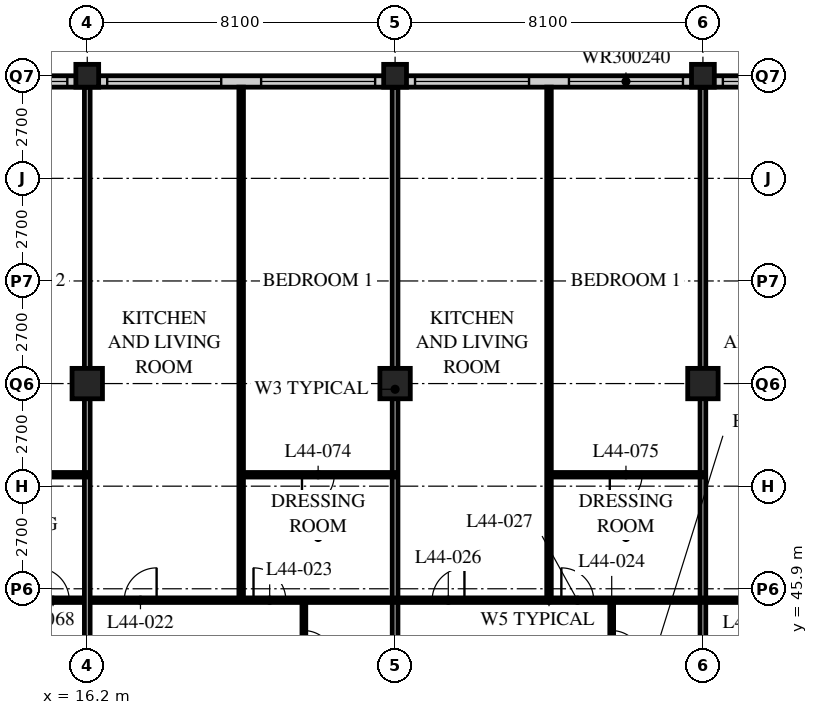
"""IFC4 building model, lengths in metres.
Left out: names, types, materials, properties, quantities, classifications, styles, units other than length and angle.
Written with IfcOpenShell. Run it as: python <this file> out.ifc"""

import sys

from ifc_helpers import new_model, si_unit, direction, frame, frame_2d, origin, origin_2d, place, context, subcontext, project, spatial, rectangle, hollow_rectangle, extrude, element, fill, save


model = new_model("IFC4")
c1 = context("Model", 3, precision=1e-05, world=origin(), true_north=direction((0.0, 1.0)))
c2 = subcontext(c1, "Body", "Model", "MODEL_VIEW")
j1 = project(units=[si_unit("LENGTHUNIT", "METRE"), si_unit("PLANEANGLEUNIT", "RADIAN")], contexts=[c1])
p1 = place(None, origin())
s1 = spatial("IfcSite", under=j1, at=p1, CompositionType="ELEMENT")
p2 = place(p1, origin())
s2 = spatial("IfcBuilding", under=s1, at=p2, CompositionType="ELEMENT")
p3 = place(p2, frame((0.0, 0.0, 174.0)))
s3 = spatial("IfcBuildingStorey", under=s2, at=p3, CompositionType="ELEMENT", Elevation=174.0)
p4 = place(p3, frame((16.2, 51.3, 0.0), z_axis=(0.0, 0.0, 1.0), x_axis=(1.0, 0.0, 0.0)))
e1 = element("IfcColumn", 1, at=p4, inside=s3, PredefinedType="COLUMN", context=c2, shape_type="SweptSolid", body=[
    extrude(hollow_rectangle(XDim=0.8, YDim=0.8, WallThickness=0.08, at=origin_2d()), origin(), (0.0, 0.0, 1.0), 3.6),
])
p5 = place(p3, frame((16.2, 59.4, 0.0), z_axis=(0.0, 0.0, 1.0), x_axis=(1.0, 0.0, 0.0)))
e2 = element("IfcColumn", 2, at=p5, inside=s3, PredefinedType="COLUMN", context=c2, shape_type="SweptSolid", body=[
    extrude(hollow_rectangle(XDim=0.6, YDim=0.6, WallThickness=0.05, at=origin_2d()), origin(), (0.0, 0.0, 1.0), 3.6),
])
p6 = place(p3, frame((24.3, 51.3, 0.0), z_axis=(0.0, 0.0, 1.0), x_axis=(1.0, 0.0, 0.0)))
e3 = element("IfcColumn", 3, at=p6, inside=s3, PredefinedType="COLUMN", context=c2, shape_type="SweptSolid", body=[
    extrude(hollow_rectangle(XDim=0.8, YDim=0.8, WallThickness=0.08, at=origin_2d()), origin(), (0.0, 0.0, 1.0), 3.6),
])
p7 = place(p3, frame((24.3, 59.4, 0.0), z_axis=(0.0, 0.0, 1.0), x_axis=(1.0, 0.0, 0.0)))
e4 = element("IfcColumn", 4, at=p7, inside=s3, PredefinedType="COLUMN", context=c2, shape_type="SweptSolid", body=[
    extrude(hollow_rectangle(XDim=0.6, YDim=0.6, WallThickness=0.05, at=origin_2d()), origin(), (0.0, 0.0, 1.0), 3.6),
])
p8 = place(p3, frame((32.4, 51.3, 0.0), z_axis=(0.0, 0.0, 1.0), x_axis=(1.0, 0.0, 0.0)))
e5 = element("IfcColumn", 5, at=p8, inside=s3, PredefinedType="COLUMN", context=c2, shape_type="SweptSolid", body=[
    extrude(hollow_rectangle(XDim=0.8, YDim=0.8, WallThickness=0.08, at=origin_2d()), origin(), (0.0, 0.0, 1.0), 3.6),
])
p9 = place(p3, frame((32.4, 59.4, 0.0), z_axis=(0.0, 0.0, 1.0), x_axis=(1.0, 0.0, 0.0)))
e6 = element("IfcColumn", 6, at=p9, inside=s3, PredefinedType="COLUMN", context=c2, shape_type="SweptSolid", body=[
    extrude(hollow_rectangle(XDim=0.6, YDim=0.6, WallThickness=0.05, at=origin_2d()), origin(), (0.0, 0.0, 1.0), 3.6),
])
p10 = place(p3, frame((48.3, 59.25, 0.0), z_axis=(0.0, 0.0, 1.0), x_axis=(-1.0, 0.0, 0.0)))
e7 = element("IfcWall", 7, at=p10, inside=s3, PredefinedType="SOLIDWALL", context=c2, shape_type="SweptSolid", body=[
    extrude(rectangle(XDim=40.2, YDim=0.3, at=frame_2d((20.1, 0.0))), origin(), (0.0, 0.0, 1.0), 3.39),
])
p11 = place(p10, frame((0.225, 0.0, 0.6)))
e8 = element("IfcOpeningElement", 8, at=p11, cuts=e7, PredefinedType="OPENING", context=c2, shape_type="SweptSolid", body=[
    extrude(rectangle(XDim=3.0, YDim=2.4, at=frame_2d((1.5, 1.2))), frame((0.0, 0.16, 0.0), z_axis=(0.0, -1.0, 0.0), x_axis=(1.0, 0.0, 0.0)), (0.0, 0.0, 1.0), 0.32),
])
p12 = place(p10, frame((4.275, 0.0, 0.6)))
e9 = element("IfcOpeningElement", 9, at=p12, cuts=e7, PredefinedType="OPENING", context=c2, shape_type="SweptSolid", body=[
    extrude(rectangle(XDim=3.0, YDim=2.4, at=frame_2d((1.5, 1.2))), frame((0.0, 0.16, 0.0), z_axis=(0.0, -1.0, 0.0), x_axis=(1.0, 0.0, 0.0)), (0.0, 0.0, 1.0), 0.32),
])
p13 = place(p10, frame((8.325, 0.0, 0.6)))
e10 = element("IfcOpeningElement", 10, at=p13, cuts=e7, PredefinedType="OPENING", context=c2, shape_type="SweptSolid", body=[
    extrude(rectangle(XDim=3.0, YDim=2.4, at=frame_2d((1.5, 1.2))), frame((0.0, 0.16, 0.0), z_axis=(0.0, -1.0, 0.0), x_axis=(1.0, 0.0, 0.0)), (0.0, 0.0, 1.0), 0.32),
])
p14 = place(p10, frame((12.375, 0.0, 0.6)))
e11 = element("IfcOpeningElement", 11, at=p14, cuts=e7, PredefinedType="OPENING", context=c2, shape_type="SweptSolid", body=[
    extrude(rectangle(XDim=3.0, YDim=2.4, at=frame_2d((1.5, 1.2))), frame((0.0, 0.16, 0.0), z_axis=(0.0, -1.0, 0.0), x_axis=(1.0, 0.0, 0.0)), (0.0, 0.0, 1.0), 0.32),
])
p15 = place(p10, frame((16.425, 0.0, 0.6)))
e12 = element("IfcOpeningElement", 12, at=p15, cuts=e7, PredefinedType="OPENING", context=c2, shape_type="SweptSolid", body=[
    extrude(rectangle(XDim=3.0, YDim=2.4, at=frame_2d((1.5, 1.2))), frame((0.0, 0.16, 0.0), z_axis=(0.0, -1.0, 0.0), x_axis=(1.0, 0.0, 0.0)), (0.0, 0.0, 1.0), 0.32),
])
p16 = place(p10, frame((20.475, 0.0, 0.6)))
e13 = element("IfcOpeningElement", 13, at=p16, cuts=e7, PredefinedType="OPENING", context=c2, shape_type="SweptSolid", body=[
    extrude(rectangle(XDim=3.0, YDim=2.4, at=frame_2d((1.5, 1.2))), frame((0.0, 0.16, 0.0), z_axis=(0.0, -1.0, 0.0), x_axis=(1.0, 0.0, 0.0)), (0.0, 0.0, 1.0), 0.32),
])
p17 = place(p10, frame((24.525, 0.0, 0.6)))
e14 = element("IfcOpeningElement", 14, at=p17, cuts=e7, PredefinedType="OPENING", context=c2, shape_type="SweptSolid", body=[
    extrude(rectangle(XDim=3.0, YDim=2.4, at=frame_2d((1.5, 1.2))), frame((0.0, 0.16, 0.0), z_axis=(0.0, -1.0, 0.0), x_axis=(1.0, 0.0, 0.0)), (0.0, 0.0, 1.0), 0.32),
])
p18 = place(p10, frame((28.575, 0.0, 0.6)))
e15 = element("IfcOpeningElement", 15, at=p18, cuts=e7, PredefinedType="OPENING", context=c2, shape_type="SweptSolid", body=[
    extrude(rectangle(XDim=3.0, YDim=2.4, at=frame_2d((1.5, 1.2))), frame((0.0, 0.16, 0.0), z_axis=(0.0, -1.0, 0.0), x_axis=(1.0, 0.0, 0.0)), (0.0, 0.0, 1.0), 0.32),
])
p19 = place(p10, frame((32.625, 0.0, 0.6)))
e16 = element("IfcOpeningElement", 16, at=p19, cuts=e7, PredefinedType="OPENING", context=c2, shape_type="SweptSolid", body=[
    extrude(rectangle(XDim=3.0, YDim=2.4, at=frame_2d((1.5, 1.2))), frame((0.0, 0.16, 0.0), z_axis=(0.0, -1.0, 0.0), x_axis=(1.0, 0.0, 0.0)), (0.0, 0.0, 1.0), 0.32),
])
p20 = place(p10, frame((36.675, 0.0, 0.6)))
e17 = element("IfcOpeningElement", 17, at=p20, cuts=e7, PredefinedType="OPENING", context=c2, shape_type="SweptSolid", body=[
    extrude(rectangle(XDim=3.0, YDim=2.4, at=frame_2d((1.5, 1.2))), frame((0.0, 0.16, 0.0), z_axis=(0.0, -1.0, 0.0), x_axis=(1.0, 0.0, 0.0)), (0.0, 0.0, 1.0), 0.32),
])
p21 = place(p3, frame((21.9, 43.2, 0.0), z_axis=(0.0, 0.0, 1.0), x_axis=(0.0, 1.0, 0.0)))
e18 = element("IfcWall", 18, at=p21, inside=s3, PredefinedType="PARTITIONING", context=c2, shape_type="SweptSolid", body=[
    extrude(rectangle(XDim=2.4, YDim=0.1, at=frame_2d((1.2, 0.0))), origin(), (0.0, 0.0, 1.0), 3.39),
])
p22 = place(p21, frame((0.8, 0.0, 0.0)))
e19 = element("IfcOpeningElement", 19, at=p22, cuts=e18, PredefinedType="OPENING", context=c2, shape_type="SweptSolid", body=[
    extrude(rectangle(XDim=0.8, YDim=2.1, at=frame_2d((0.4, 1.05))), frame((0.0, 0.06, 0.0), z_axis=(0.0, -1.0, 0.0), x_axis=(1.0, 0.0, 0.0)), (0.0, 0.0, 1.0), 0.12),
])
p23 = place(p3, frame((20.25, 45.6, 0.0), z_axis=(0.0, 0.0, 1.0), x_axis=(0.0, 1.0, 0.0)))
e20 = element("IfcWall", 20, at=p23, inside=s3, PredefinedType="PARTITIONING", context=c2, shape_type="SweptSolid", body=[
    extrude(rectangle(XDim=13.5, YDim=0.12, at=frame_2d((6.75, 0.0))), origin(), (0.0, 0.0, 1.0), 3.39),
])
p24 = place(p3, frame((24.3, 43.2, 0.0), z_axis=(0.0, 0.0, 1.0), x_axis=(0.0, 1.0, 0.0)))
e21 = element("IfcWall", 21, at=p24, inside=s3, PredefinedType="PARTITIONING", context=c2, shape_type="SweptSolid", body=[
    extrude(rectangle(XDim=15.9, YDim=0.15, at=frame_2d((7.95, 0.0))), origin(), (0.0, 0.0, 1.0), 2.778),
])
p25 = place(p3, frame((30.0, 43.2, 0.0), z_axis=(0.0, 0.0, 1.0), x_axis=(0.0, 1.0, 0.0)))
e22 = element("IfcWall", 22, at=p25, inside=s3, PredefinedType="PARTITIONING", context=c2, shape_type="SweptSolid", body=[
    extrude(rectangle(XDim=2.4, YDim=0.1, at=frame_2d((1.2, 0.0))), origin(), (0.0, 0.0, 1.0), 3.39),
])
p26 = place(p25, frame((0.8, 0.0, 0.0)))
e23 = element("IfcOpeningElement", 23, at=p26, cuts=e22, PredefinedType="OPENING", context=c2, shape_type="SweptSolid", body=[
    extrude(rectangle(XDim=0.8, YDim=2.1, at=frame_2d((0.4, 1.05))), frame((0.0, 0.06, 0.0), z_axis=(0.0, -1.0, 0.0), x_axis=(1.0, 0.0, 0.0)), (0.0, 0.0, 1.0), 0.12),
])
p27 = place(p3, frame((28.35, 45.6, 0.0), z_axis=(0.0, 0.0, 1.0), x_axis=(0.0, 1.0, 0.0)))
e24 = element("IfcWall", 24, at=p27, inside=s3, PredefinedType="PARTITIONING", context=c2, shape_type="SweptSolid", body=[
    extrude(rectangle(XDim=13.5, YDim=0.12, at=frame_2d((6.75, 0.0))), origin(), (0.0, 0.0, 1.0), 3.39),
])
p28 = place(p3, frame((32.4, 43.2, 0.0), z_axis=(0.0, 0.0, 1.0), x_axis=(0.0, 1.0, 0.0)))
e25 = element("IfcWall", 25, at=p28, inside=s3, PredefinedType="PARTITIONING", context=c2, shape_type="SweptSolid", body=[
    extrude(rectangle(XDim=15.9, YDim=0.15, at=frame_2d((7.95, 0.0))), origin(), (0.0, 0.0, 1.0), 2.778),
])
p29 = place(p3, frame((8.15, 45.6, 0.0), z_axis=(0.0, 0.0, 1.0), x_axis=(1.0, 0.0, 0.0)))
e26 = element("IfcWall", 26, at=p29, inside=s3, PredefinedType="PARTITIONING", context=c2, shape_type="SweptSolid", body=[
    extrude(rectangle(XDim=40.4, YDim=0.12, at=frame_2d((20.2, 0.0))), origin(), (0.0, 0.0, 1.0), 3.39),
])
p30 = place(p29, frame((9.025, 0.0, 0.0)))
e27 = element("IfcOpeningElement", 27, at=p30, cuts=e26, PredefinedType="OPENING", context=c2, shape_type="SweptSolid", body=[
    extrude(rectangle(XDim=0.85, YDim=2.1, at=frame_2d((0.425, 1.05))), frame((0.0, 0.07, 0.0), z_axis=(0.0, -1.0, 0.0), x_axis=(1.0, 0.0, 0.0)), (0.0, 0.0, 1.0), 0.14),
])
p31 = place(p29, frame((12.425, 0.0, 0.0)))
e28 = element("IfcOpeningElement", 28, at=p31, cuts=e26, PredefinedType="OPENING", context=c2, shape_type="SweptSolid", body=[
    extrude(rectangle(XDim=0.85, YDim=2.1, at=frame_2d((0.425, 1.05))), frame((0.0, 0.07, 0.0), z_axis=(0.0, -1.0, 0.0), x_axis=(1.0, 0.0, 0.0)), (0.0, 0.0, 1.0), 0.14),
])
p32 = place(p29, frame((17.125, 0.0, 0.0)))
e29 = element("IfcOpeningElement", 29, at=p32, cuts=e26, PredefinedType="OPENING", context=c2, shape_type="SweptSolid", body=[
    extrude(rectangle(XDim=0.85, YDim=2.1, at=frame_2d((0.425, 1.05))), frame((0.0, 0.07, 0.0), z_axis=(0.0, -1.0, 0.0), x_axis=(1.0, 0.0, 0.0)), (0.0, 0.0, 1.0), 0.14),
])
p33 = place(p29, frame((20.525, 0.0, 0.0)))
e30 = element("IfcOpeningElement", 30, at=p33, cuts=e26, PredefinedType="OPENING", context=c2, shape_type="SweptSolid", body=[
    extrude(rectangle(XDim=0.85, YDim=2.1, at=frame_2d((0.425, 1.05))), frame((0.0, 0.07, 0.0), z_axis=(0.0, -1.0, 0.0), x_axis=(1.0, 0.0, 0.0)), (0.0, 0.0, 1.0), 0.14),
])
p34 = place(p29, frame((25.225, 0.0, 0.0)))
e31 = element("IfcOpeningElement", 31, at=p34, cuts=e26, PredefinedType="OPENING", context=c2, shape_type="SweptSolid", body=[
    extrude(rectangle(XDim=0.85, YDim=2.1, at=frame_2d((0.425, 1.05))), frame((0.0, 0.07, 0.0), z_axis=(0.0, -1.0, 0.0), x_axis=(1.0, 0.0, 0.0)), (0.0, 0.0, 1.0), 0.14),
])
p35 = place(p29, frame((28.625, 0.0, 0.0)))
e32 = element("IfcOpeningElement", 32, at=p35, cuts=e26, PredefinedType="OPENING", context=c2, shape_type="SweptSolid", body=[
    extrude(rectangle(XDim=0.85, YDim=2.1, at=frame_2d((0.425, 1.05))), frame((0.0, 0.07, 0.0), z_axis=(0.0, -1.0, 0.0), x_axis=(1.0, 0.0, 0.0)), (0.0, 0.0, 1.0), 0.14),
])
p36 = place(p29, frame((32.825, 0.0, 0.0)))
e33 = element("IfcOpeningElement", 33, at=p36, cuts=e26, PredefinedType="OPENING", context=c2, shape_type="SweptSolid", body=[
    extrude(rectangle(XDim=0.85, YDim=2.1, at=frame_2d((0.425, 1.05))), frame((0.0, 0.07, 0.0), z_axis=(0.0, -1.0, 0.0), x_axis=(1.0, 0.0, 0.0)), (0.0, 0.0, 1.0), 0.14),
])
p37 = place(p29, frame((36.675, 0.0, 0.0)))
e34 = element("IfcOpeningElement", 34, at=p37, cuts=e26, PredefinedType="OPENING", context=c2, shape_type="SweptSolid", body=[
    extrude(rectangle(XDim=0.85, YDim=2.1, at=frame_2d((0.425, 1.05))), frame((0.0, 0.07, 0.0), z_axis=(0.0, -1.0, 0.0), x_axis=(1.0, 0.0, 0.0)), (0.0, 0.0, 1.0), 0.14),
])
p38 = place(p29, frame((6.725, 0.0, 0.0)))
e35 = element("IfcOpeningElement", 35, at=p38, cuts=e26, PredefinedType="OPENING", context=c2, shape_type="SweptSolid", body=[
    extrude(rectangle(XDim=0.85, YDim=2.1, at=frame_2d((0.425, 1.05))), frame((0.0, 0.07, 0.0), z_axis=(0.0, -1.0, 0.0), x_axis=(1.0, 0.0, 0.0)), (0.0, 0.0, 1.0), 0.14),
])
p39 = place(p29, frame((2.875, 0.0, 0.0)))
e36 = element("IfcOpeningElement", 36, at=p39, cuts=e26, PredefinedType="OPENING", context=c2, shape_type="SweptSolid", body=[
    extrude(rectangle(XDim=0.85, YDim=2.1, at=frame_2d((0.425, 1.05))), frame((0.0, 0.07, 0.0), z_axis=(0.0, -1.0, 0.0), x_axis=(1.0, 0.0, 0.0)), (0.0, 0.0, 1.0), 0.14),
])
p40 = place(p3, frame((16.2, 43.2, 0.0), z_axis=(0.0, 0.0, 1.0), x_axis=(0.0, 1.0, 0.0)))
e37 = element("IfcWall", 37, at=p40, inside=s3, PredefinedType="PARTITIONING", context=c2, shape_type="SweptSolid", body=[
    extrude(rectangle(XDim=15.9, YDim=0.15, at=frame_2d((7.95, 0.0))), origin(), (0.0, 0.0, 1.0), 2.778),
])
p41 = place(p3, frame((20.25, 48.9, 0.0), z_axis=(0.0, 0.0, 1.0), x_axis=(1.0, 0.0, 0.0)))
e38 = element("IfcWall", 38, at=p41, inside=s3, PredefinedType="PARTITIONING", context=c2, shape_type="SweptSolid", body=[
    extrude(rectangle(XDim=4.05, YDim=0.12, at=frame_2d((2.025, 0.0))), origin(), (0.0, 0.0, 1.0), 3.39),
])
p42 = place(p41, frame((1.6, 0.0, 0.0)))
e39 = element("IfcOpeningElement", 39, at=p42, cuts=e38, PredefinedType="OPENING", context=c2, shape_type="SweptSolid", body=[
    extrude(rectangle(XDim=0.85, YDim=2.1, at=frame_2d((0.425, 1.05))), frame((0.0, 0.07, 0.0), z_axis=(0.0, -1.0, 0.0), x_axis=(1.0, 0.0, 0.0)), (0.0, 0.0, 1.0), 0.14),
])
p43 = place(p3, frame((28.35, 48.9, 0.0), z_axis=(0.0, 0.0, 1.0), x_axis=(1.0, 0.0, 0.0)))
e40 = element("IfcWall", 40, at=p43, inside=s3, PredefinedType="PARTITIONING", context=c2, shape_type="SweptSolid", body=[
    extrude(rectangle(XDim=4.05, YDim=0.12, at=frame_2d((2.025, 0.0))), origin(), (0.0, 0.0, 1.0), 3.39),
])
p44 = place(p43, frame((1.6, 0.0, 0.0)))
e41 = element("IfcOpeningElement", 41, at=p44, cuts=e40, PredefinedType="OPENING", context=c2, shape_type="SweptSolid", body=[
    extrude(rectangle(XDim=0.85, YDim=2.1, at=frame_2d((0.425, 1.05))), frame((0.0, 0.07, 0.0), z_axis=(0.0, -1.0, 0.0), x_axis=(1.0, 0.0, 0.0)), (0.0, 0.0, 1.0), 0.14),
])
p45 = place(p3, frame((12.15, 48.9, 0.0), z_axis=(0.0, 0.0, 1.0), x_axis=(1.0, 0.0, 0.0)))
e42 = element("IfcWall", 42, at=p45, inside=s3, PredefinedType="PARTITIONING", context=c2, shape_type="SweptSolid", body=[
    extrude(rectangle(XDim=4.05, YDim=0.12, at=frame_2d((2.025, 0.0))), origin(), (0.0, 0.0, 1.0), 3.39),
])
p46 = place(p45, frame((1.6, 0.0, 0.0)))
e43 = element("IfcOpeningElement", 43, at=p46, cuts=e42, PredefinedType="OPENING", context=c2, shape_type="SweptSolid", body=[
    extrude(rectangle(XDim=0.85, YDim=2.1, at=frame_2d((0.425, 1.05))), frame((0.0, 0.07, 0.0), z_axis=(0.0, -1.0, 0.0), x_axis=(1.0, 0.0, 0.0)), (0.0, 0.0, 1.0), 0.14),
])
p47 = place(p14, origin())
e44 = element("IfcWindow", 44, at=p47, inside=s3, PartitioningType="SINGLE_PANEL", PredefinedType="WINDOW", context=c2, shape_type="SweptSolid", body=[
    extrude(rectangle(XDim=3.0, YDim=2.4, at=frame_2d((1.5, 1.2))), frame((0.0, 0.03, 0.0), z_axis=(0.0, -1.0, 0.0), x_axis=(1.0, 0.0, 0.0)), (0.0, 0.0, 1.0), 0.06),
])
fill(e11, e44)
p48 = place(p15, origin())
e45 = element("IfcWindow", 45, at=p48, inside=s3, PartitioningType="SINGLE_PANEL", PredefinedType="WINDOW", context=c2, shape_type="SweptSolid", body=[
    extrude(rectangle(XDim=3.0, YDim=2.4, at=frame_2d((1.5, 1.2))), frame((0.0, 0.03, 0.0), z_axis=(0.0, -1.0, 0.0), x_axis=(1.0, 0.0, 0.0)), (0.0, 0.0, 1.0), 0.06),
])
fill(e12, e45)
p49 = place(p16, origin())
e46 = element("IfcWindow", 46, at=p49, inside=s3, PartitioningType="SINGLE_PANEL", PredefinedType="WINDOW", context=c2, shape_type="SweptSolid", body=[
    extrude(rectangle(XDim=3.0, YDim=2.4, at=frame_2d((1.5, 1.2))), frame((0.0, 0.03, 0.0), z_axis=(0.0, -1.0, 0.0), x_axis=(1.0, 0.0, 0.0)), (0.0, 0.0, 1.0), 0.06),
])
fill(e13, e46)
p50 = place(p17, origin())
e47 = element("IfcWindow", 47, at=p50, inside=s3, PartitioningType="SINGLE_PANEL", PredefinedType="WINDOW", context=c2, shape_type="SweptSolid", body=[
    extrude(rectangle(XDim=3.0, YDim=2.4, at=frame_2d((1.5, 1.2))), frame((0.0, 0.03, 0.0), z_axis=(0.0, -1.0, 0.0), x_axis=(1.0, 0.0, 0.0)), (0.0, 0.0, 1.0), 0.06),
])
fill(e14, e47)
p51 = place(p18, origin())
e48 = element("IfcWindow", 48, at=p51, inside=s3, PartitioningType="SINGLE_PANEL", PredefinedType="WINDOW", context=c2, shape_type="SweptSolid", body=[
    extrude(rectangle(XDim=3.0, YDim=2.4, at=frame_2d((1.5, 1.2))), frame((0.0, 0.03, 0.0), z_axis=(0.0, -1.0, 0.0), x_axis=(1.0, 0.0, 0.0)), (0.0, 0.0, 1.0), 0.06),
])
fill(e15, e48)
p52 = place(p19, origin())
e49 = element("IfcWindow", 49, at=p52, inside=s3, PartitioningType="SINGLE_PANEL", PredefinedType="WINDOW", context=c2, shape_type="SweptSolid", body=[
    extrude(rectangle(XDim=3.0, YDim=2.4, at=frame_2d((1.5, 1.2))), frame((0.0, 0.03, 0.0), z_axis=(0.0, -1.0, 0.0), x_axis=(1.0, 0.0, 0.0)), (0.0, 0.0, 1.0), 0.06),
])
fill(e16, e49)
p53 = place(p22, origin())
e50 = element("IfcDoor", 50, at=p53, inside=s3, OperationType="SINGLE_SWING_RIGHT", PredefinedType="DOOR", context=c2, shape_type="SweptSolid", body=[
    extrude(rectangle(XDim=0.8, YDim=2.1, at=frame_2d((0.4, 1.05))), frame((0.0, 0.025, 0.0), z_axis=(0.0, -1.0, 0.0), x_axis=(1.0, 0.0, 0.0)), (0.0, 0.0, 1.0), 0.05),
])
fill(e19, e50)
p54 = place(p30, origin())
e51 = element("IfcDoor", 51, at=p54, inside=s3, OperationType="SINGLE_SWING_RIGHT", PredefinedType="DOOR", context=c2, shape_type="SweptSolid", body=[
    extrude(rectangle(XDim=0.85, YDim=2.1, at=frame_2d((0.425, 1.05))), frame((0.0, 0.025, 0.0), z_axis=(0.0, -1.0, 0.0), x_axis=(1.0, 0.0, 0.0)), (0.0, 0.0, 1.0), 0.05),
])
fill(e27, e51)
p55 = place(p31, origin())
e52 = element("IfcDoor", 52, at=p55, inside=s3, OperationType="SINGLE_SWING_LEFT", PredefinedType="DOOR", context=c2, shape_type="SweptSolid", body=[
    extrude(rectangle(XDim=0.85, YDim=2.1, at=frame_2d((0.425, 1.05))), frame((0.0, 0.025, 0.0), z_axis=(0.0, -1.0, 0.0), x_axis=(1.0, 0.0, 0.0)), (0.0, 0.0, 1.0), 0.05),
])
fill(e28, e52)
p56 = place(p26, origin())
e53 = element("IfcDoor", 53, at=p56, inside=s3, OperationType="SINGLE_SWING_RIGHT", PredefinedType="DOOR", context=c2, shape_type="SweptSolid", body=[
    extrude(rectangle(XDim=0.8, YDim=2.1, at=frame_2d((0.4, 1.05))), frame((0.0, 0.025, 0.0), z_axis=(0.0, -1.0, 0.0), x_axis=(1.0, 0.0, 0.0)), (0.0, 0.0, 1.0), 0.05),
])
fill(e23, e53)
p57 = place(p32, origin())
e54 = element("IfcDoor", 54, at=p57, inside=s3, OperationType="SINGLE_SWING_RIGHT", PredefinedType="DOOR", context=c2, shape_type="SweptSolid", body=[
    extrude(rectangle(XDim=0.85, YDim=2.1, at=frame_2d((0.425, 1.05))), frame((0.0, 0.025, 0.0), z_axis=(0.0, -1.0, 0.0), x_axis=(1.0, 0.0, 0.0)), (0.0, 0.0, 1.0), 0.05),
])
fill(e29, e54)
p58 = place(p33, origin())
e55 = element("IfcDoor", 55, at=p58, inside=s3, OperationType="SINGLE_SWING_LEFT", PredefinedType="DOOR", context=c2, shape_type="SweptSolid", body=[
    extrude(rectangle(XDim=0.85, YDim=2.1, at=frame_2d((0.425, 1.05))), frame((0.0, 0.025, 0.0), z_axis=(0.0, -1.0, 0.0), x_axis=(1.0, 0.0, 0.0)), (0.0, 0.0, 1.0), 0.05),
])
fill(e30, e55)
p59 = place(p38, origin())
e56 = element("IfcDoor", 56, at=p59, inside=s3, OperationType="SINGLE_SWING_LEFT", PredefinedType="DOOR", context=c2, shape_type="SweptSolid", body=[
    extrude(rectangle(XDim=0.85, YDim=2.1, at=frame_2d((0.425, 1.05))), frame((0.0, 0.025, 0.0), z_axis=(0.0, -1.0, 0.0), x_axis=(1.0, 0.0, 0.0)), (0.0, 0.0, 1.0), 0.05),
])
fill(e35, e56)
p60 = place(p42, origin())
e57 = element("IfcDoor", 57, at=p60, inside=s3, OperationType="SINGLE_SWING_RIGHT", PredefinedType="DOOR", context=c2, shape_type="SweptSolid", body=[
    extrude(rectangle(XDim=0.85, YDim=2.1, at=frame_2d((0.425, 1.05))), frame((0.0, 0.025, 0.0), z_axis=(0.0, -1.0, 0.0), x_axis=(1.0, 0.0, 0.0)), (0.0, 0.0, 1.0), 0.05),
])
fill(e39, e57)
p61 = place(p44, origin())
e58 = element("IfcDoor", 58, at=p61, inside=s3, OperationType="SINGLE_SWING_RIGHT", PredefinedType="DOOR", context=c2, shape_type="SweptSolid", body=[
    extrude(rectangle(XDim=0.85, YDim=2.1, at=frame_2d((0.425, 1.05))), frame((0.0, 0.025, 0.0), z_axis=(0.0, -1.0, 0.0), x_axis=(1.0, 0.0, 0.0)), (0.0, 0.0, 1.0), 0.05),
])
fill(e41, e58)
save(model, sys.argv[1])
